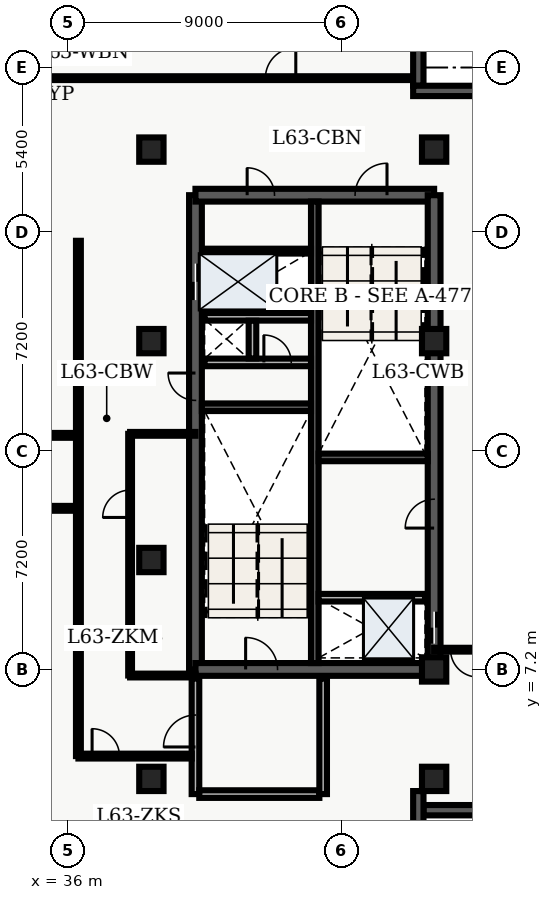
"""IFC4 building model, lengths in metres.
Left out: names, types, materials, properties, quantities, classifications, styles, units other than length and angle.
Written with IfcOpenShell. Run it as: python <this file> out.ifc"""

import sys

from ifc_helpers import new_model, entity, si_unit, converted_unit, direction, frame, origin_with_axes, origin_2d_with_axis, place, context, subcontext, project, spatial, polyline, rectangle, outline, extrude, element, fill, save


model = new_model("IFC4")
c1 = context("Model", 3, precision=1e-05, world=origin_with_axes(), true_north=direction((0.0, 1.0)))
c2 = subcontext(c1, "Body", "Model", "MODEL_VIEW")
j1 = project(units=[si_unit("LENGTHUNIT", "METRE"), converted_unit("PLANEANGLEUNIT", "DEGREE", entity("IfcPlaneAngleMeasure", 0.017), si_unit("PLANEANGLEUNIT", "RADIAN"), dimensions=[0, 0, 0, 0, 0, 0, 0])], contexts=[c1])
p1 = place(None, origin_with_axes())
s1 = spatial("IfcSite", under=j1, at=p1, CompositionType="ELEMENT")
p2 = place(p1, origin_with_axes())
s2 = spatial("IfcBuilding", under=s1, at=p2, CompositionType="ELEMENT")
p3 = place(p2, frame((0.0, 0.0, 256.8), z_axis=(0.0, 0.0, 1.0), x_axis=(1.0, 0.0, 0.0)))
s3 = spatial("IfcBuildingStorey", under=s2, at=p3, CompositionType="ELEMENT", Elevation=256.8)
p4 = place(p3, frame((40.2, 7.2, 0.0), z_axis=(0.0, 0.0, 1.0), x_axis=(0.0, 1.0, 0.0)))
e1 = element("IfcWall", 1, at=p4, inside=s3, PredefinedType="SHEAR", context=c2, shape_type="SweptSolid", body=[
    extrude(outline(polyline([(0.0, -0.21), (15.6, -0.21), (15.6, 0.21), (0.0, 0.21), (0.0, -0.21)])), origin_with_axes(), (0.0, 0.0, 1.0), 3.66),
])
p5 = place(p4, frame((12.75, 0.0, 0.0), z_axis=(0.0, 0.0, 1.0), x_axis=(1.0, 0.0, 0.0)))
e2 = element("IfcOpeningElement", 2, at=p5, cuts=e1, PredefinedType="OPENING", context=c2, shape_type="SweptSolid", body=[
    extrude(rectangle(XDim=1.2, YDim=0.44, at=origin_2d_with_axis()), origin_with_axes(), (0.0, 0.0, 1.0), 2.15),
])
p6 = place(p4, frame((9.3, 0.0, 0.0), z_axis=(0.0, 0.0, 1.0), x_axis=(1.0, 0.0, 0.0)))
e3 = element("IfcOpeningElement", 3, at=p6, cuts=e1, PredefinedType="OPENING", context=c2, shape_type="SweptSolid", body=[
    extrude(rectangle(XDim=0.9, YDim=0.44, at=origin_2d_with_axis()), origin_with_axes(), (0.0, 0.0, 1.0), 2.15),
])
p7 = place(p3, frame((40.2, 7.2, 0.0), z_axis=(0.0, 0.0, 1.0), x_axis=(1.0, 0.0, 0.0)))
e4 = element("IfcWall", 4, at=p7, inside=s3, PredefinedType="SHEAR", context=c2, shape_type="SweptSolid", body=[
    extrude(outline(polyline([(0.0, -0.21), (7.85, -0.21), (7.85, 0.21), (0.0, 0.21), (0.0, -0.21)])), origin_with_axes(), (0.0, 0.0, 1.0), 3.66),
])
p8 = place(p7, frame((2.175, 0.0, 0.0), z_axis=(0.0, 0.0, 1.0), x_axis=(1.0, 0.0, 0.0)))
e5 = element("IfcOpeningElement", 5, at=p8, cuts=e4, PredefinedType="OPENING", context=c2, shape_type="SweptSolid", body=[
    extrude(rectangle(XDim=1.05, YDim=0.44, at=origin_2d_with_axis()), origin_with_axes(), (0.0, 0.0, 1.0), 2.15),
])
p9 = place(p3, frame((40.2, 22.8, 0.0), z_axis=(0.0, 0.0, 1.0), x_axis=(1.0, 0.0, 0.0)))
e6 = element("IfcWall", 6, at=p9, inside=s3, PredefinedType="SHEAR", context=c2, shape_type="SweptSolid", body=[
    extrude(outline(polyline([(0.0, -0.21), (7.85, -0.21), (7.85, 0.21), (0.0, 0.21), (0.0, -0.21)])), origin_with_axes(), (0.0, 0.0, 1.0), 3.66),
])
p10 = place(p9, frame((5.775, 0.0, 0.0), z_axis=(0.0, 0.0, 1.0), x_axis=(1.0, 0.0, 0.0)))
e7 = element("IfcOpeningElement", 7, at=p10, cuts=e6, PredefinedType="OPENING", context=c2, shape_type="SweptSolid", body=[
    extrude(rectangle(XDim=1.05, YDim=0.44, at=origin_2d_with_axis()), origin_with_axes(), (0.0, 0.0, 1.0), 2.15),
])
p11 = place(p9, frame((2.15, 0.0, 0.0), z_axis=(0.0, 0.0, 1.0), x_axis=(1.0, 0.0, 0.0)))
e8 = element("IfcOpeningElement", 8, at=p11, cuts=e6, PredefinedType="OPENING", context=c2, shape_type="SweptSolid", body=[
    extrude(rectangle(XDim=0.9, YDim=0.44, at=origin_2d_with_axis()), origin_with_axes(), (0.0, 0.0, 1.0), 2.15),
])
p12 = place(p3, frame((48.05, 7.2, 0.0), z_axis=(0.0, 0.0, 1.0), x_axis=(0.0, 1.0, 0.0)))
e9 = element("IfcWall", 9, at=p12, inside=s3, PredefinedType="SHEAR", context=c2, shape_type="SweptSolid", body=[
    extrude(outline(polyline([(0.0, -0.21), (15.6, -0.21), (15.6, 0.21), (0.0, 0.21), (0.0, -0.21)])), origin_with_axes(), (0.0, 0.0, 1.0), 3.66),
])
p13 = place(p12, frame((1.375, 0.0, 0.0), z_axis=(0.0, 0.0, 1.0), x_axis=(1.0, 0.0, 0.0)))
e10 = element("IfcOpeningElement", 10, at=p13, cuts=e9, PredefinedType="OPENING", context=c2, shape_type="SweptSolid", body=[
    extrude(rectangle(XDim=1.05, YDim=0.44, at=origin_2d_with_axis()), origin_with_axes(), (0.0, 0.0, 1.0), 2.15),
])
p14 = place(p12, frame((5.125, 0.0, 0.0), z_axis=(0.0, 0.0, 1.0), x_axis=(1.0, 0.0, 0.0)))
e11 = element("IfcOpeningElement", 11, at=p14, cuts=e9, PredefinedType="OPENING", context=c2, shape_type="SweptSolid", body=[
    extrude(rectangle(XDim=0.95, YDim=0.44, at=origin_2d_with_axis()), origin_with_axes(), (0.0, 0.0, 1.0), 2.15),
])
p15 = place(p3, frame((44.125, 7.41, 0.0), z_axis=(0.0, 0.0, 1.0), x_axis=(0.0, 1.0, 0.0)))
e12 = element("IfcWall", 12, at=p15, inside=s3, PredefinedType="SHEAR", context=c2, shape_type="SweptSolid", body=[
    extrude(outline(polyline([(0.0, -0.125), (15.18, -0.125), (15.18, 0.125), (0.0, 0.125), (0.0, -0.125)])), origin_with_axes(), (0.0, 0.0, 1.0), 3.66),
])
for number, where, z_axis, x_axis in (
    (13, (40.41, 15.825, 0.0), (0.0, 0.0, 1.0), (1.0, 0.0, 0.0)),
    (14, (44.25, 14.175, 0.0), (0.0, 0.0, 1.0), (1.0, 0.0, 0.0)),
):
    element("IfcWall", number, at=place(p3, frame(where, z_axis=z_axis, x_axis=x_axis)), inside=s3, PredefinedType="SHEAR", context=c2, shape_type="SweptSolid", body=[
        extrude(outline(polyline([(0.0, -0.125), (3.59, -0.125), (3.59, 0.125), (0.0, 0.125), (0.0, -0.125)])), origin_with_axes(), (0.0, 0.0, 1.0), 3.66),
    ])
p16 = place(p3, frame((40.5, 17.3, 0.0), z_axis=(0.0, 0.0, 1.0), x_axis=(1.0, 0.0, 0.0)))
e15 = element("IfcWall", 15, at=p16, inside=s3, PredefinedType="SOLIDWALL", context=c2, shape_type="SweptSolid", body=[
    extrude(outline(polyline([(0.0, -0.125), (3.5, -0.125), (3.5, 0.125), (0.0, 0.125), (0.0, -0.125)])), origin_with_axes(), (0.0, 0.0, 1.0), 2.7),
])
p17 = place(p16, frame((2.4, 0.0, 0.0), z_axis=(0.0, 0.0, 1.0), x_axis=(1.0, 0.0, 0.0)))
e16 = element("IfcOpeningElement", 16, at=p17, cuts=e15, PredefinedType="OPENING", context=c2, shape_type="SweptSolid", body=[
    extrude(rectangle(XDim=0.9, YDim=0.27, at=origin_2d_with_axis()), origin_with_axes(), (0.0, 0.0, 1.0), 2.15),
])
p18 = place(p3, frame((40.5, 18.8, 0.0), z_axis=(0.0, 0.0, 1.0), x_axis=(1.0, 0.0, 0.0)))
e17 = element("IfcWall", 17, at=p18, inside=s3, PredefinedType="SOLIDWALL", context=c2, shape_type="SweptSolid", body=[
    extrude(outline(polyline([(0.0, -0.125), (3.5, -0.125), (3.5, 0.125), (0.0, 0.125), (0.0, -0.125)])), origin_with_axes(), (0.0, 0.0, 1.0), 2.7),
])
p19 = place(p3, frame((42.075, 17.43, 0.0), z_axis=(0.0, 0.0, 1.0), x_axis=(0.0, 1.0, 0.0)))
e18 = element("IfcWall", 18, at=p19, inside=s3, PredefinedType="SOLIDWALL", context=c2, shape_type="SweptSolid", body=[
    extrude(outline(polyline([(0.0, -0.125), (1.24, -0.125), (1.24, 0.125), (0.0, 0.125), (0.0, -0.125)])), origin_with_axes(), (0.0, 0.0, 1.0), 2.7),
])
p20 = place(p3, frame((40.2, 3.1, 0.0), z_axis=(0.0, 0.0, 1.0), x_axis=(0.0, 1.0, 0.0)))
e19 = element("IfcWall", 19, at=p20, inside=s3, PredefinedType="SOLIDWALL", context=c2, shape_type="SweptSolid", body=[
    extrude(outline(polyline([(0.0, -0.125), (3.8, -0.125), (3.8, 0.125), (0.0, 0.125), (0.0, -0.125)])), origin_with_axes(), (0.0, 0.0, 1.0), 2.7),
])
p21 = place(p20, frame((2.075, 0.0, 0.0), z_axis=(0.0, 0.0, 1.0), x_axis=(1.0, 0.0, 0.0)))
e20 = element("IfcOpeningElement", 20, at=p21, cuts=e19, PredefinedType="OPENING", context=c2, shape_type="SweptSolid", body=[
    extrude(rectangle(XDim=1.05, YDim=0.27, at=origin_2d_with_axis()), origin_with_axes(), (0.0, 0.0, 1.0), 2.15),
])
p22 = place(p3, frame((40.325, 3.1, 0.0), z_axis=(0.0, 0.0, 1.0), x_axis=(1.0, 0.0, 0.0)))
e21 = element("IfcWall", 21, at=p22, inside=s3, PredefinedType="SOLIDWALL", context=c2, shape_type="SweptSolid", body=[
    extrude(outline(polyline([(0.0, -0.125), (3.95, -0.125), (3.95, 0.125), (0.0, 0.125), (0.0, -0.125)])), origin_with_axes(), (0.0, 0.0, 1.0), 2.7),
])
p23 = place(p3, frame((44.4, 3.1, 0.0), z_axis=(0.0, 0.0, 1.0), x_axis=(0.0, 1.0, 0.0)))
e22 = element("IfcWall", 22, at=p23, inside=s3, PredefinedType="SOLIDWALL", context=c2, shape_type="SweptSolid", body=[
    extrude(outline(polyline([(0.0, -0.125), (3.8, -0.125), (3.8, 0.125), (0.0, 0.125), (0.0, -0.125)])), origin_with_axes(), (0.0, 0.0, 1.0), 2.7),
])
for number, where, z_axis, x_axis in (
    (23, (38.75, 3.6, 0.0), (0.0, 0.0, 1.0), (1.0, 0.0, 0.0)),
    (24, (38.75, 10.8, 0.0), (0.0, 0.0, 1.0), (1.0, 0.0, 0.0)),
    (25, (38.75, 18.0, 0.0), (0.0, 0.0, 1.0), (1.0, 0.0, 0.0)),
    (26, (38.75, 24.3, 0.0), (0.0, 0.0, 1.0), (1.0, 0.0, 0.0)),
    (27, (48.05, 3.6, 0.0), (0.0, 0.0, 1.0), (1.0, 0.0, 0.0)),
    (28, (48.05, 7.2, 0.0), (0.0, 0.0, 1.0), (1.0, 0.0, 0.0)),
    (29, (48.05, 18.0, 0.0), (0.0, 0.0, 1.0), (1.0, 0.0, 0.0)),
    (30, (48.05, 24.3, 0.0), (0.0, 0.0, 1.0), (1.0, 0.0, 0.0)),
):
    element("IfcColumn", number, at=place(p3, frame(where, z_axis=z_axis, x_axis=x_axis)), inside=s3, PredefinedType="COLUMN", context=c2, shape_type="SweptSolid", body=[
        extrude(rectangle(XDim=0.8, YDim=0.8, at=origin_2d_with_axis()), origin_with_axes(), (0.0, 0.0, 1.0), 3.9),
    ])
p24 = place(p3, frame((40.5, 20.96, 0.0), z_axis=(0.0, 0.0, 1.0), x_axis=(1.0, 0.0, 0.0)))
e31 = element("IfcWall", 31, at=p24, inside=s3, PredefinedType="PARTITIONING", context=c2, shape_type="SweptSolid", body=[
    extrude(outline(polyline([(0.0, -0.08), (3.5, -0.08), (3.5, 0.08), (0.0, 0.08), (0.0, -0.08)])), origin_with_axes(), (0.0, 0.0, 1.0), 2.7),
])
p25 = place(p3, frame((44.25, 9.56, 0.0), z_axis=(0.0, 0.0, 1.0), x_axis=(1.0, 0.0, 0.0)))
e32 = element("IfcWall", 32, at=p25, inside=s3, PredefinedType="SOLIDWALL", context=c2, shape_type="SweptSolid", body=[
    extrude(outline(polyline([(0.0, -0.125), (3.5, -0.125), (3.5, 0.125), (0.0, 0.125), (0.0, -0.125)])), origin_with_axes(), (0.0, 0.0, 1.0), 2.7),
])
p26 = place(p3, frame((20.3, 12.5, 0.0), z_axis=(0.0, 0.0, 1.0), x_axis=(1.0, 0.0, 0.0)))
e33 = element("IfcWall", 33, at=p26, inside=s3, PredefinedType="PARTITIONING", context=c2, shape_type="SweptSolid", body=[
    extrude(outline(polyline([(0.0, -0.08), (16.05, -0.08), (16.05, 0.08), (0.0, 0.08), (0.0, -0.08)])), origin_with_axes(), (0.0, 0.0, 1.0), 2.7),
])
p27 = place(p26, frame((3.645, 0.0, 0.0), z_axis=(0.0, 0.0, 1.0), x_axis=(1.0, 0.0, 0.0)))
e34 = element("IfcOpeningElement", 34, at=p27, cuts=e33, PredefinedType="OPENING", context=c2, shape_type="SweptSolid", body=[
    extrude(rectangle(XDim=1.0, YDim=0.18, at=origin_2d_with_axis()), origin_with_axes(), (0.0, 0.0, 1.0), 2.15),
])
p28 = place(p26, frame((11.54, 0.0, 0.0), z_axis=(0.0, 0.0, 1.0), x_axis=(1.0, 0.0, 0.0)))
e35 = element("IfcOpeningElement", 35, at=p28, cuts=e33, PredefinedType="OPENING", context=c2, shape_type="SweptSolid", body=[
    extrude(rectangle(XDim=1.0, YDim=0.18, at=origin_2d_with_axis()), origin_with_axes(), (0.0, 0.0, 1.0), 2.15),
])
p29 = place(p3, frame((20.3, 14.9, 0.0), z_axis=(0.0, 0.0, 1.0), x_axis=(1.0, 0.0, 0.0)))
e36 = element("IfcWall", 36, at=p29, inside=s3, PredefinedType="PARTITIONING", context=c2, shape_type="SweptSolid", body=[
    extrude(outline(polyline([(0.0, -0.08), (16.05, -0.08), (16.05, 0.08), (0.0, 0.08), (0.0, -0.08)])), origin_with_axes(), (0.0, 0.0, 1.0), 2.7),
])
p30 = place(p29, frame((5.582, 0.0, 0.0), z_axis=(0.0, 0.0, 1.0), x_axis=(1.0, 0.0, 0.0)))
e37 = element("IfcOpeningElement", 37, at=p30, cuts=e36, PredefinedType="OPENING", context=c2, shape_type="SweptSolid", body=[
    extrude(rectangle(XDim=1.2, YDim=0.18, at=origin_2d_with_axis()), origin_with_axes(), (0.0, 0.0, 1.0), 2.2),
])
p31 = place(p29, frame((13.477, 0.0, 0.0), z_axis=(0.0, 0.0, 1.0), x_axis=(1.0, 0.0, 0.0)))
e38 = element("IfcOpeningElement", 38, at=p31, cuts=e36, PredefinedType="OPENING", context=c2, shape_type="SweptSolid", body=[
    extrude(rectangle(XDim=1.0, YDim=0.18, at=origin_2d_with_axis()), origin_with_axes(), (0.0, 0.0, 1.0), 2.15),
])
p32 = place(p3, frame((36.35, 4.35, 0.0), z_axis=(0.0, 0.0, 1.0), x_axis=(0.0, 1.0, 0.0)))
e39 = element("IfcWall", 39, at=p32, inside=s3, PredefinedType="PARTITIONING", context=c2, shape_type="SweptSolid", body=[
    extrude(outline(polyline([(0.0, -0.08), (16.95, -0.08), (16.95, 0.08), (0.0, 0.08), (0.0, -0.08)])), origin_with_axes(), (0.0, 0.0, 1.0), 2.7),
])
p33 = place(p3, frame((49.765, 7.85, 0.0), z_axis=(0.0, 0.0, 1.0), x_axis=(-1.0, 0.0, 0.0)))
e40 = element("IfcWall", 40, at=p33, inside=s3, PredefinedType="PARTITIONING", context=c2, shape_type="SweptSolid", body=[
    extrude(outline(polyline([(0.0, -0.062), (1.715, -0.062), (1.715, 0.062), (0.0, 0.062), (0.0, -0.062)])), origin_with_axes(), (0.0, 0.0, 1.0), 2.7),
])
p34 = place(p33, frame((0.725, 0.0, 0.0), z_axis=(0.0, 0.0, 1.0), x_axis=(1.0, 0.0, 0.0)))
e41 = element("IfcOpeningElement", 41, at=p34, cuts=e40, PredefinedType="OPENING", context=c2, shape_type="SweptSolid", body=[
    extrude(rectangle(XDim=0.9, YDim=0.145, at=origin_2d_with_axis()), origin_with_axes(), (0.0, 0.0, 1.0), 2.15),
])
p35 = place(p3, frame((34.535, 26.65, 0.0), z_axis=(0.0, 0.0, 1.0), x_axis=(1.0, 0.0, 0.0)))
e42 = element("IfcWall", 42, at=p35, inside=s3, PredefinedType="PARTITIONING", context=c2, shape_type="SweptSolid", body=[
    extrude(outline(polyline([(0.0, -0.062), (12.995, -0.062), (12.995, 0.062), (0.0, 0.062), (0.0, -0.062)])), origin_with_axes(), (0.0, 0.0, 1.0), 2.7),
])
p36 = place(p35, frame((8.465, 0.0, 0.0), z_axis=(0.0, 0.0, 1.0), x_axis=(1.0, 0.0, 0.0)))
e43 = element("IfcOpeningElement", 43, at=p36, cuts=e42, PredefinedType="OPENING", context=c2, shape_type="SweptSolid", body=[
    extrude(rectangle(XDim=1.0, YDim=0.145, at=origin_2d_with_axis()), origin_with_axes(), (0.0, 0.0, 1.0), 2.15),
])
p37 = place(p3, frame((36.35, 4.35, 0.0), z_axis=(0.0, 0.0, 1.0), x_axis=(1.0, 0.0, 0.0)))
e44 = element("IfcWall", 44, at=p37, inside=s3, PredefinedType="PARTITIONING", context=c2, shape_type="SweptSolid", body=[
    extrude(outline(polyline([(0.0, -0.08), (3.725, -0.08), (3.725, 0.08), (0.0, 0.08), (0.0, -0.08)])), origin_with_axes(), (0.0, 0.0, 1.0), 2.7),
])
p38 = place(p37, frame((0.9, 0.0, 0.0), z_axis=(0.0, 0.0, 1.0), x_axis=(1.0, 0.0, 0.0)))
e45 = element("IfcOpeningElement", 45, at=p38, cuts=e44, PredefinedType="OPENING", context=c2, shape_type="SweptSolid", body=[
    extrude(rectangle(XDim=0.9, YDim=0.18, at=origin_2d_with_axis()), origin_with_axes(), (0.0, 0.0, 1.0), 2.15),
])
for number, where, z_axis, x_axis in (
    (46, (38.05, 7.0, 0.0), (0.0, 0.0, 1.0), (1.0, 0.0, 0.0)),
    (47, (38.05, 14.95, 0.0), (0.0, 0.0, 1.0), (1.0, 0.0, 0.0)),
):
    element("IfcWall", number, at=place(p3, frame(where, z_axis=z_axis, x_axis=x_axis)), inside=s3, PredefinedType="PARTITIONING", context=c2, shape_type="SweptSolid", body=[
        extrude(outline(polyline([(0.0, -0.062), (2.15, -0.062), (2.15, 0.062), (0.0, 0.062), (0.0, -0.062)])), origin_with_axes(), (0.0, 0.0, 1.0), 2.7),
    ])
p39 = place(p3, frame((38.05, 7.0, 0.0), z_axis=(0.0, 0.0, 1.0), x_axis=(0.0, 1.0, 0.0)))
e48 = element("IfcWall", 48, at=p39, inside=s3, PredefinedType="PARTITIONING", context=c2, shape_type="SweptSolid", body=[
    extrude(outline(polyline([(0.0, -0.062), (7.95, -0.062), (7.95, 0.062), (0.0, 0.062), (0.0, -0.062)])), origin_with_axes(), (0.0, 0.0, 1.0), 2.7),
])
p40 = place(p39, frame((5.65, 0.0, 0.0), z_axis=(0.0, 0.0, 1.0), x_axis=(1.0, 0.0, 0.0)))
e49 = element("IfcOpeningElement", 49, at=p40, cuts=e48, PredefinedType="OPENING", context=c2, shape_type="SweptSolid", body=[
    extrude(rectangle(XDim=0.9, YDim=0.145, at=origin_2d_with_axis()), origin_with_axes(), (0.0, 0.0, 1.0), 2.15),
])
p41 = place(p3, frame((47.53, 28.46, 0.0), z_axis=(0.0, 0.0, 1.0), x_axis=(0.0, -1.0, 0.0)))
e50 = element("IfcWall", 50, at=p41, inside=s3, PredefinedType="SOLIDWALL", context=c2, shape_type="SweptSolid", body=[
    extrude(outline(polyline([(0.0, -0.17), (2.06, -0.17), (2.06, 0.17), (0.0, 0.17), (0.0, -0.17)])), origin_with_axes(), (0.0, 0.0, 1.0), 3.66),
])
p42 = place(p3, frame((47.36, 26.23, 0.0), z_axis=(0.0, 0.0, 1.0), x_axis=(1.0, 0.0, 0.0)))
e51 = element("IfcWall", 51, at=p42, inside=s3, PredefinedType="SOLIDWALL", context=c2, shape_type="SweptSolid", body=[
    extrude(outline(polyline([(0.0, -0.17), (2.74, -0.17), (2.74, 0.17), (0.0, 0.17), (0.0, -0.17)])), origin_with_axes(), (0.0, 0.0, 1.0), 3.66),
])
p43 = place(p3, frame((49.76, 2.57, 0.0), z_axis=(0.0, 0.0, 1.0), x_axis=(-1.0, 0.0, 0.0)))
e52 = element("IfcWall", 52, at=p43, inside=s3, PredefinedType="SOLIDWALL", context=c2, shape_type="SweptSolid", body=[
    extrude(outline(polyline([(0.0, -0.17), (2.06, -0.17), (2.06, 0.17), (0.0, 0.17), (0.0, -0.17)])), origin_with_axes(), (0.0, 0.0, 1.0), 3.66),
])
p44 = place(p3, frame((47.53, 3.2, 0.0), z_axis=(0.0, 0.0, 1.0), x_axis=(0.0, -1.0, 0.0)))
e53 = element("IfcWall", 53, at=p44, inside=s3, PredefinedType="SOLIDWALL", context=c2, shape_type="SweptSolid", body=[
    extrude(outline(polyline([(0.0, -0.17), (3.2, -0.17), (3.2, 0.17), (0.0, 0.17), (0.0, -0.17)])), origin_with_axes(), (0.0, 0.0, 1.0), 3.66),
])
p45 = place(p12, frame((1.375, 0.0, 0.0), z_axis=(0.0, 0.0, 1.0), x_axis=(1.0, 0.0, 0.0)))
e54 = element("IfcDoor", 54, at=p45, inside=s3, OperationType="SLIDING_TO_LEFT", PredefinedType="DOOR", context=c2, shape_type="SweptSolid", body=[
    extrude(rectangle(XDim=1.05, YDim=0.09, at=origin_2d_with_axis()), origin_with_axes(), (0.0, 0.0, 1.0), 2.15),
])
fill(e10, e54)
p46 = place(p4, frame((12.75, 0.0, 0.0), z_axis=(0.0, 0.0, 1.0), x_axis=(1.0, 0.0, 0.0)))
e55 = element("IfcDoor", 55, at=p46, inside=s3, OperationType="DOUBLE_DOOR_SLIDING", PredefinedType="DOOR", context=c2, shape_type="SweptSolid", body=[
    extrude(rectangle(XDim=1.2, YDim=0.09, at=origin_2d_with_axis()), origin_with_axes(), (0.0, 0.0, 1.0), 2.15),
])
fill(e2, e55)
p47 = place(p4, frame((9.3, 0.0, 0.0), z_axis=(0.0, 0.0, 1.0), x_axis=(1.0, 0.0, 0.0)))
e56 = element("IfcDoor", 56, at=p47, inside=s3, OperationType="SINGLE_SWING_RIGHT", PredefinedType="DOOR", context=c2, shape_type="SweptSolid", body=[
    extrude(rectangle(XDim=0.9, YDim=0.09, at=origin_2d_with_axis()), origin_with_axes(), (0.0, 0.0, 1.0), 2.15),
])
fill(e3, e56)
p48 = place(p16, frame((2.4, 0.0, 0.0), z_axis=(0.0, 0.0, 1.0), x_axis=(1.0, 0.0, 0.0)))
e57 = element("IfcDoor", 57, at=p48, inside=s3, OperationType="SINGLE_SWING_LEFT", PredefinedType="DOOR", context=c2, shape_type="SweptSolid", body=[
    extrude(rectangle(XDim=0.9, YDim=0.09, at=origin_2d_with_axis()), origin_with_axes(), (0.0, 0.0, 1.0), 2.15),
])
fill(e16, e57)
p49 = place(p7, frame((2.175, 0.0, 0.0), z_axis=(0.0, 0.0, 1.0), x_axis=(1.0, 0.0, 0.0)))
e58 = element("IfcDoor", 58, at=p49, inside=s3, OperationType="SINGLE_SWING_LEFT", PredefinedType="DOOR", context=c2, shape_type="SweptSolid", body=[
    extrude(rectangle(XDim=1.05, YDim=0.09, at=origin_2d_with_axis()), origin_with_axes(), (0.0, 0.0, 1.0), 2.15),
])
fill(e5, e58)
p50 = place(p9, frame((5.775, 0.0, 0.0), z_axis=(0.0, 0.0, 1.0), x_axis=(1.0, 0.0, 0.0)))
e59 = element("IfcDoor", 59, at=p50, inside=s3, OperationType="SINGLE_SWING_RIGHT", PredefinedType="DOOR", context=c2, shape_type="SweptSolid", body=[
    extrude(rectangle(XDim=1.05, YDim=0.09, at=origin_2d_with_axis()), origin_with_axes(), (0.0, 0.0, 1.0), 2.15),
])
fill(e7, e59)
p51 = place(p20, frame((2.075, 0.0, 0.0), z_axis=(0.0, 0.0, 1.0), x_axis=(1.0, 0.0, 0.0)))
e60 = element("IfcDoor", 60, at=p51, inside=s3, OperationType="SINGLE_SWING_LEFT", PredefinedType="DOOR", context=c2, shape_type="SweptSolid", body=[
    extrude(rectangle(XDim=1.05, YDim=0.09, at=origin_2d_with_axis()), origin_with_axes(), (0.0, 0.0, 1.0), 2.15),
])
fill(e20, e60)
p52 = place(p9, frame((2.15, 0.0, 0.0), z_axis=(0.0, 0.0, 1.0), x_axis=(1.0, 0.0, 0.0)))
e61 = element("IfcDoor", 61, at=p52, inside=s3, OperationType="SINGLE_SWING_LEFT", PredefinedType="DOOR", context=c2, shape_type="SweptSolid", body=[
    extrude(rectangle(XDim=0.9, YDim=0.09, at=origin_2d_with_axis()), origin_with_axes(), (0.0, 0.0, 1.0), 2.15),
])
fill(e8, e61)
p53 = place(p12, frame((5.125, 0.0, 0.0), z_axis=(0.0, 0.0, 1.0), x_axis=(1.0, 0.0, 0.0)))
e62 = element("IfcDoor", 62, at=p53, inside=s3, OperationType="SINGLE_SWING_LEFT", PredefinedType="DOOR", context=c2, shape_type="SweptSolid", body=[
    extrude(rectangle(XDim=0.95, YDim=0.09, at=origin_2d_with_axis()), origin_with_axes(), (0.0, 0.0, 1.0), 2.15),
])
fill(e11, e62)
p54 = place(p33, frame((0.725, 0.0, 0.0), z_axis=(0.0, 0.0, 1.0), x_axis=(1.0, 0.0, 0.0)))
e63 = element("IfcDoor", 63, at=p54, inside=s3, OperationType="SINGLE_SWING_LEFT", PredefinedType="DOOR", context=c2, shape_type="SweptSolid", body=[
    extrude(rectangle(XDim=0.9, YDim=0.075, at=origin_2d_with_axis()), origin_with_axes(), (0.0, 0.0, 1.0), 2.15),
])
fill(e41, e63)
p55 = place(p35, frame((8.465, 0.0, 0.0), z_axis=(0.0, 0.0, 1.0), x_axis=(1.0, 0.0, 0.0)))
e64 = element("IfcDoor", 64, at=p55, inside=s3, OperationType="SINGLE_SWING_RIGHT", PredefinedType="DOOR", context=c2, shape_type="SweptSolid", body=[
    extrude(rectangle(XDim=1.0, YDim=0.075, at=origin_2d_with_axis()), origin_with_axes(), (0.0, 0.0, 1.0), 2.15),
])
fill(e43, e64)
p56 = place(p37, frame((0.9, 0.0, 0.0), z_axis=(0.0, 0.0, 1.0), x_axis=(1.0, 0.0, 0.0)))
e65 = element("IfcDoor", 65, at=p56, inside=s3, OperationType="SINGLE_SWING_LEFT", PredefinedType="DOOR", context=c2, shape_type="SweptSolid", body=[
    extrude(rectangle(XDim=0.9, YDim=0.09, at=origin_2d_with_axis()), origin_with_axes(), (0.0, 0.0, 1.0), 2.15),
])
fill(e45, e65)
p57 = place(p39, frame((5.65, 0.0, 0.0), z_axis=(0.0, 0.0, 1.0), x_axis=(1.0, 0.0, 0.0)))
e66 = element("IfcDoor", 66, at=p57, inside=s3, OperationType="SINGLE_SWING_LEFT", PredefinedType="DOOR", context=c2, shape_type="SweptSolid", body=[
    extrude(rectangle(XDim=0.9, YDim=0.075, at=origin_2d_with_axis()), origin_with_axes(), (0.0, 0.0, 1.0), 2.15),
])
fill(e49, e66)
save(model, sys.argv[1])
